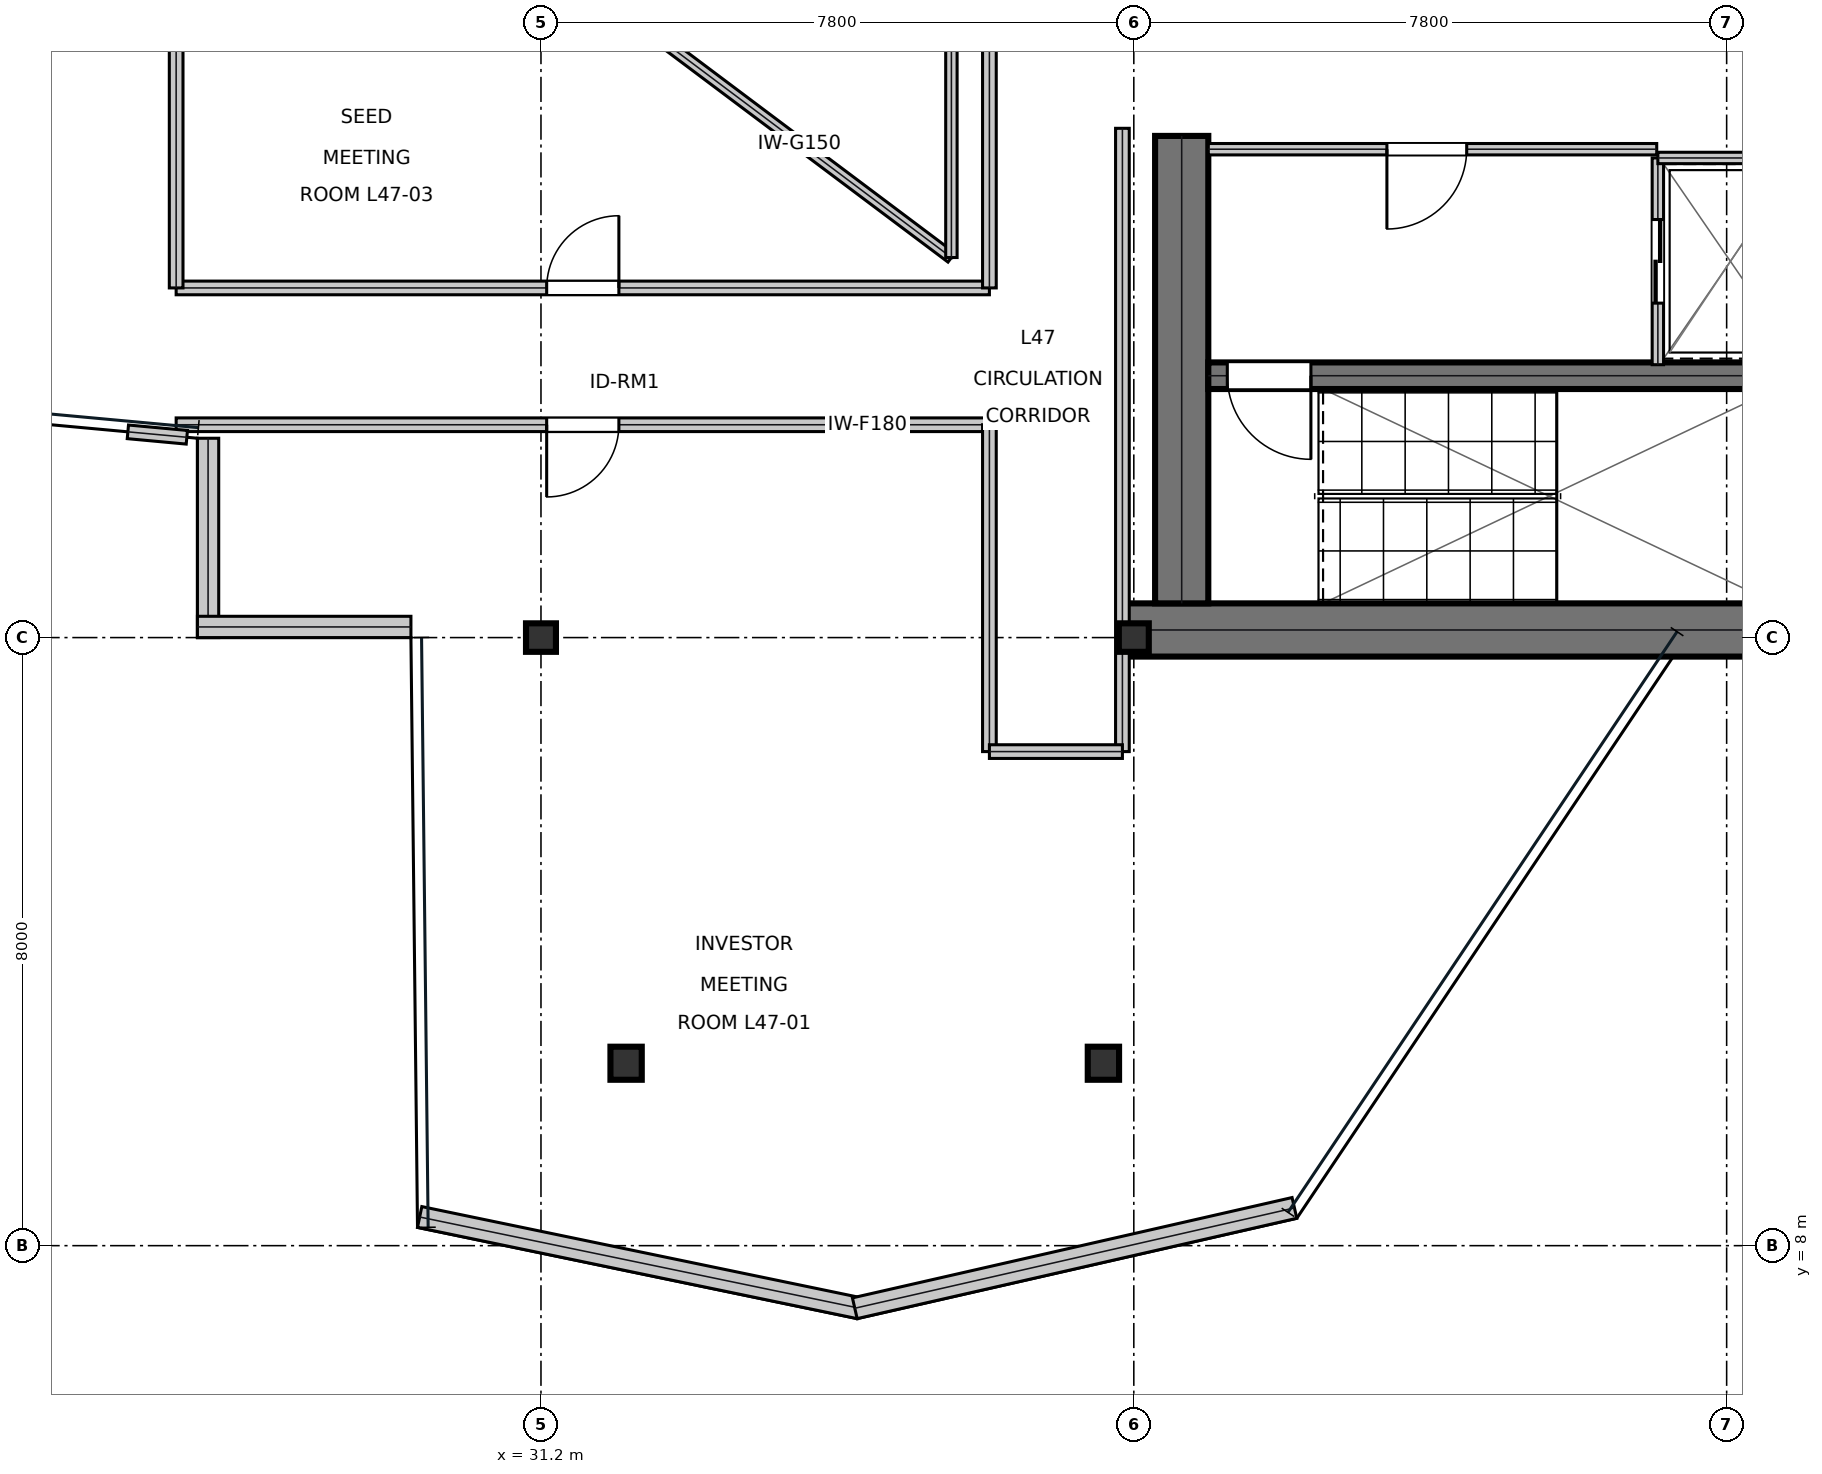
"""IFC4 building model, lengths in metres.
Left out: names, types, materials, properties, quantities, classifications, styles, units other than length and angle.
Written with IfcOpenShell. Run it as: python <this file> out.ifc"""

import sys

from ifc_helpers import new_model, si_unit, direction, frame, frame_2d, origin, origin_2d, place, context, subcontext, project, spatial, rectangle, i_section, extrude, element, fill, save


model = new_model("IFC4")
c1 = context("Model", 3, precision=1e-05, world=origin(), true_north=direction((0.0, 1.0)))
c2 = subcontext(c1, "Body", "Model", "MODEL_VIEW")
j1 = project(units=[si_unit("LENGTHUNIT", "METRE"), si_unit("PLANEANGLEUNIT", "RADIAN")], contexts=[c1])
p1 = place(None, origin())
s1 = spatial("IfcSite", under=j1, at=p1, CompositionType="ELEMENT")
p2 = place(p1, origin())
s2 = spatial("IfcBuilding", under=s1, at=p2, CompositionType="ELEMENT")
p3 = place(p2, frame((0.0, 0.0, 204.0)))
s3 = spatial("IfcBuildingStorey", under=s2, at=p3, CompositionType="ELEMENT", Elevation=204.0)
p4 = place(p3, frame((38.8, 16.1, 0.0), z_axis=(0.0, 0.0, 1.0), x_axis=(1.0, 0.0, 0.0)))
e1 = element("IfcWall", 1, at=p4, inside=s3, PredefinedType="SHEAR", context=c2, shape_type="SweptSolid", body=[
    extrude(rectangle(XDim=16.0, YDim=0.7, at=frame_2d((8.0, 0.0))), origin(), (0.0, 0.0, 1.0), 3.79),
])
p5 = place(p3, frame((39.63, 16.45, 0.0), z_axis=(0.0, 0.0, 1.0), x_axis=(0.0, 1.0, 0.0)))
e2 = element("IfcWall", 2, at=p5, inside=s3, PredefinedType="SHEAR", context=c2, shape_type="SweptSolid", body=[
    extrude(rectangle(XDim=6.15, YDim=0.7, at=frame_2d((3.075, 0.0))), origin(), (0.0, 0.0, 1.0), 3.79),
])
p6 = place(p3, frame((39.98, 19.445, 0.0), z_axis=(0.0, 0.0, 1.0), x_axis=(1.0, 0.0, 0.0)))
e3 = element("IfcWall", 3, at=p6, inside=s3, PredefinedType="SHEAR", context=c2, shape_type="SweptSolid", body=[
    extrude(rectangle(XDim=7.71, YDim=0.35, at=frame_2d((3.855, 0.0))), origin(), (0.0, 0.0, 1.0), 3.79),
])
p7 = place(p6, frame((0.25, 0.0, 0.0)))
e4 = element("IfcOpeningElement", 4, at=p7, cuts=e3, PredefinedType="OPENING", context=c2, shape_type="SweptSolid", body=[
    extrude(rectangle(XDim=1.1, YDim=2.15, at=frame_2d((0.55, 1.075))), frame((0.0, 0.185, 0.0), z_axis=(0.0, -1.0, 0.0), x_axis=(1.0, 0.0, 0.0)), (0.0, 0.0, 1.0), 0.37),
])
for number, where, z_axis, x_axis in (
    (5, (31.2, 16.0, 0.0), (0.0, 0.0, 1.0), (1.0, 0.0, 0.0)),
    (6, (39.0, 16.0, 0.0), (0.0, 0.0, 1.0), (1.0, 0.0, 0.0)),
):
    element("IfcColumn", number, at=place(p3, frame(where, z_axis=z_axis, x_axis=x_axis)), inside=s3, PredefinedType="COLUMN", context=c2, shape_type="SweptSolid", body=[
        extrude(i_section(OverallWidth=0.394, OverallDepth=0.375, WebThickness=0.017, FlangeThickness=0.028, at=origin_2d()), origin(), (0.0, 0.0, 1.0), 4.044),
    ])
for number, where, z_axis, x_axis in (
    (7, (32.32, 10.4, 0.016), (0.0, 0.0, 1.0), (1.0, 0.0, 0.0)),
    (8, (38.6, 10.4, 0.016), (0.0, 0.0, 1.0), (1.0, 0.0, 0.0)),
):
    element("IfcColumn", number, at=place(p3, frame(where, z_axis=z_axis, x_axis=x_axis)), inside=s3, PredefinedType="COLUMN", context=c2, shape_type="SweptSolid", body=[
        extrude(i_section(OverallWidth=0.412, OverallDepth=0.435, WebThickness=0.036, FlangeThickness=0.058, at=origin_2d()), origin(), (0.0, 0.0, 1.0), 4.018),
    ])
p8 = place(p3, frame((26.82, 18.622, 0.0), z_axis=(0.0, 0.0, 1.0), x_axis=(0.0, -1.0, 0.0)))
e9 = element("IfcWall", 9, at=p8, inside=s3, PredefinedType="STANDARD", context=c2, shape_type="SweptSolid", body=[
    extrude(rectangle(XDim=2.622, YDim=0.28, at=frame_2d((1.311, 0.0))), origin(), (0.0, 0.0, 1.0), 3.319),
])
p9 = place(p3, frame((26.68, 16.14, 0.0), z_axis=(0.0, 0.0, 1.0), x_axis=(1.0, 0.0, 0.0)))
e10 = element("IfcWall", 10, at=p9, inside=s3, PredefinedType="STANDARD", context=c2, shape_type="SweptSolid", body=[
    extrude(rectangle(XDim=2.809, YDim=0.28, at=frame_2d((1.405, 0.0))), origin(), (0.0, 0.0, 1.0), 3.79),
])
p10 = place(p3, frame((29.604, 8.377, 0.0), z_axis=(0.0, 0.0, 1.0), x_axis=(0.979145472124, -0.203160390873, 0.0)))
e11 = element("IfcWall", 11, at=p10, inside=s3, PredefinedType="STANDARD", context=c2, shape_type="SweptSolid", body=[
    extrude(rectangle(XDim=5.908, YDim=0.28, at=frame_2d((2.954, 0.0))), origin(), (0.0, 0.0, 1.0), 3.79),
])
p11 = place(p3, frame((35.329, 7.177, 0.0), z_axis=(0.0, 0.0, 1.0), x_axis=(0.974934808954, 0.222490715064, 0.0)))
e12 = element("IfcWall", 12, at=p11, inside=s3, PredefinedType="STANDARD", context=c2, shape_type="SweptSolid", body=[
    extrude(rectangle(XDim=5.933, YDim=0.28, at=frame_2d((2.967, 0.0))), origin(), (0.0, 0.0, 1.0), 3.79),
])
p12 = place(p3, frame((39.98, 22.425, 0.0), z_axis=(0.0, 0.0, 1.0), x_axis=(1.0, 0.0, 0.0)))
e13 = element("IfcWall", 13, at=p12, inside=s3, PredefinedType="PARTITIONING", context=c2, shape_type="SweptSolid", body=[
    extrude(rectangle(XDim=5.9, YDim=0.15, at=frame_2d((2.95, 0.0))), origin(), (0.0, 0.0, 1.0), 3.79),
])
p13 = place(p12, frame((2.35, 0.0, 0.0)))
e14 = element("IfcOpeningElement", 14, at=p13, cuts=e13, PredefinedType="OPENING", context=c2, shape_type="SweptSolid", body=[
    extrude(rectangle(XDim=1.05, YDim=2.15, at=frame_2d((0.525, 1.075))), frame((0.0, 0.085, 0.0), z_axis=(0.0, -1.0, 0.0), x_axis=(1.0, 0.0, 0.0)), (0.0, 0.0, 1.0), 0.17),
])
p14 = place(p3, frame((45.895, 19.59, 0.0), z_axis=(0.0, 0.0, 1.0), x_axis=(0.0, 1.0, 0.0)))
e15 = element("IfcWall", 15, at=p14, inside=s3, PredefinedType="PARTITIONING", context=c2, shape_type="SweptSolid", body=[
    extrude(rectangle(XDim=2.72, YDim=0.15, at=frame_2d((1.36, 0.0))), origin(), (0.0, 0.0, 1.0), 3.79),
])
p15 = place(p14, frame((0.81, 0.0, 0.0)))
e16 = element("IfcOpeningElement", 16, at=p15, cuts=e15, PredefinedType="OPENING", context=c2, shape_type="SweptSolid", body=[
    extrude(rectangle(XDim=1.1, YDim=2.15, at=frame_2d((0.55, 1.075))), frame((0.0, 0.085, 0.0), z_axis=(0.0, -1.0, 0.0), x_axis=(1.0, 0.0, 0.0)), (0.0, 0.0, 1.0), 0.17),
])
p16 = place(p3, frame((45.895, 22.31, 0.0), z_axis=(0.0, 0.0, 1.0), x_axis=(1.0, 0.0, 0.0)))
e17 = element("IfcWall", 17, at=p16, inside=s3, PredefinedType="PARTITIONING", context=c2, shape_type="SweptSolid", body=[
    extrude(rectangle(XDim=1.915, YDim=0.15, at=frame_2d((0.958, 0.0))), origin(), (0.0, 0.0, 1.0), 3.79),
])
p17 = place(p3, frame((26.4, 18.8, 0.0), z_axis=(0.0, 0.0, 1.0), x_axis=(1.0, 0.0, 0.0)))
e18 = element("IfcWall", 18, at=p17, inside=s3, PredefinedType="SOLIDWALL", context=c2, shape_type="SweptSolid", body=[
    extrude(rectangle(XDim=10.7, YDim=0.18, at=frame_2d((5.35, 0.0))), origin(), (0.0, 0.0, 1.0), 3.241),
])
p18 = place(p17, frame((4.875, 0.0, 0.0)))
e19 = element("IfcOpeningElement", 19, at=p18, cuts=e18, PredefinedType="OPENING", context=c2, shape_type="SweptSolid", body=[
    extrude(rectangle(XDim=0.95, YDim=2.15, at=frame_2d((0.475, 1.075))), frame((0.0, 0.1, 0.0), z_axis=(0.0, -1.0, 0.0), x_axis=(1.0, 0.0, 0.0)), (0.0, 0.0, 1.0), 0.2),
])
p19 = place(p3, frame((26.4, 20.6, 0.0), z_axis=(0.0, 0.0, 1.0), x_axis=(1.0, 0.0, 0.0)))
e20 = element("IfcWall", 20, at=p19, inside=s3, PredefinedType="SOLIDWALL", context=c2, shape_type="SweptSolid", body=[
    extrude(rectangle(XDim=10.7, YDim=0.18, at=frame_2d((5.35, 0.0))), origin(), (0.0, 0.0, 1.0), 3.241),
])
p20 = place(p19, frame((4.875, 0.0, 0.0)))
e21 = element("IfcOpeningElement", 21, at=p20, cuts=e20, PredefinedType="OPENING", context=c2, shape_type="SweptSolid", body=[
    extrude(rectangle(XDim=0.95, YDim=2.15, at=frame_2d((0.475, 1.075))), frame((0.0, 0.1, 0.0), z_axis=(0.0, -1.0, 0.0), x_axis=(1.0, 0.0, 0.0)), (0.0, 0.0, 1.0), 0.2),
])
p21 = place(p3, frame((38.85, 14.5, 0.0), z_axis=(0.0, 0.0, 1.0), x_axis=(0.0, 1.0, 0.0)))
e22 = element("IfcWall", 22, at=p21, inside=s3, PredefinedType="SOLIDWALL", context=c2, shape_type="SweptSolid", body=[
    extrude(rectangle(XDim=8.2, YDim=0.18, at=frame_2d((4.1, 0.0))), origin(), (0.0, 0.0, 1.0), 3.241),
])
p22 = place(p3, frame((37.1, 14.5, 0.0), z_axis=(0.0, 0.0, 1.0), x_axis=(0.0, 1.0, 0.0)))
e23 = element("IfcWall", 23, at=p22, inside=s3, PredefinedType="SOLIDWALL", context=c2, shape_type="SweptSolid", body=[
    extrude(rectangle(XDim=4.3, YDim=0.18, at=frame_2d((2.15, 0.0))), origin(), (0.0, 0.0, 1.0), 3.241),
])
p23 = place(p3, frame((37.1, 14.5, 0.0), z_axis=(0.0, 0.0, 1.0), x_axis=(1.0, 0.0, 0.0)))
e24 = element("IfcWall", 24, at=p23, inside=s3, PredefinedType="SOLIDWALL", context=c2, shape_type="SweptSolid", body=[
    extrude(rectangle(XDim=1.75, YDim=0.18, at=frame_2d((0.875, 0.0))), origin(), (0.0, 0.0, 1.0), 3.241),
])
p24 = place(p3, frame((25.765, 18.707, 0.0), z_axis=(0.0, 0.0, 1.0), x_axis=(0.995774178655, -0.091835641909, 0.0)))
e25 = element("IfcWall", 25, at=p24, inside=s3, PredefinedType="SOLIDWALL", context=c2, shape_type="SweptSolid", body=[
    extrude(rectangle(XDim=0.779, YDim=0.18, at=frame_2d((0.389, 0.0))), origin(), (0.0, 0.0, 1.0), 3.79),
])
p25 = place(p3, frame((26.4, 20.6, 0.0), z_axis=(0.0, 0.0, 1.0), x_axis=(0.0, 1.0, 0.0)))
e26 = element("IfcWall", 26, at=p25, inside=s3, PredefinedType="SOLIDWALL", context=c2, shape_type="SweptSolid", body=[
    extrude(rectangle(XDim=4.078, YDim=0.18, at=frame_2d((2.039, 0.0))), origin(), (0.0, 0.0, 1.0), 3.241),
])
p26 = place(p3, frame((37.1, 20.6, 0.0), z_axis=(0.0, 0.0, 1.0), x_axis=(0.0, 1.0, 0.0)))
e27 = element("IfcWall", 27, at=p26, inside=s3, PredefinedType="SOLIDWALL", context=c2, shape_type="SweptSolid", body=[
    extrude(rectangle(XDim=4.078, YDim=0.18, at=frame_2d((2.039, 0.0))), origin(), (0.0, 0.0, 1.0), 3.79),
])
p27 = place(p3, frame((32.6, 24.0, 0.0), z_axis=(0.0, 0.0, 1.0), x_axis=(0.8, -0.6, 0.0)))
e28 = element("IfcWall", 28, at=p27, inside=s3, PredefinedType="MOVABLE", context=c2, shape_type="SweptSolid", body=[
    extrude(rectangle(XDim=5.0, YDim=0.15, at=frame_2d((2.5, 0.0))), origin(), (0.0, 0.0, 1.0), 3.79),
])
p28 = place(p3, frame((36.6, 21.0, 0.0), z_axis=(0.0, 0.0, 1.0), x_axis=(0.0, 1.0, 0.0)))
e29 = element("IfcWall", 29, at=p28, inside=s3, PredefinedType="MOVABLE", context=c2, shape_type="SweptSolid", body=[
    extrude(rectangle(XDim=6.0, YDim=0.15, at=frame_2d((3.0, 0.0))), origin(), (0.0, 0.0, 1.0), 3.79),
])
p29 = place(p13, frame((1.05, 0.0, 0.0), z_axis=(0.0, 0.0, 1.0), x_axis=(-1.0, 0.0, 0.0)))
e30 = element("IfcDoor", 30, at=p29, inside=s3, OperationType="SINGLE_SWING_RIGHT", PredefinedType="DOOR", context=c2, shape_type="SweptSolid", body=[
    extrude(rectangle(XDim=1.05, YDim=2.15, at=frame_2d((0.525, 1.075))), frame((0.0, 0.025, 0.0), z_axis=(0.0, -1.0, 0.0), x_axis=(1.0, 0.0, 0.0)), (0.0, 0.0, 1.0), 0.05),
])
fill(e14, e30)
p30 = place(p15, frame((1.1, 0.0, 0.0), z_axis=(0.0, 0.0, 1.0), x_axis=(-1.0, 0.0, 0.0)))
e31 = element("IfcDoor", 31, at=p30, inside=s3, OperationType="DOUBLE_DOOR_SLIDING", PredefinedType="DOOR", context=c2, shape_type="SweptSolid", body=[
    extrude(rectangle(XDim=1.1, YDim=2.15, at=frame_2d((0.55, 1.075))), frame((0.0, 0.025, 0.0), z_axis=(0.0, -1.0, 0.0), x_axis=(1.0, 0.0, 0.0)), (0.0, 0.0, 1.0), 0.05),
])
fill(e16, e31)
p31 = place(p18, frame((0.95, 0.0, 0.0), z_axis=(0.0, 0.0, 1.0), x_axis=(-1.0, 0.0, 0.0)))
e32 = element("IfcDoor", 32, at=p31, inside=s3, OperationType="SINGLE_SWING_RIGHT", PredefinedType="DOOR", context=c2, shape_type="SweptSolid", body=[
    extrude(rectangle(XDim=0.95, YDim=2.15, at=frame_2d((0.475, 1.075))), frame((0.0, 0.025, 0.0), z_axis=(0.0, -1.0, 0.0), x_axis=(1.0, 0.0, 0.0)), (0.0, 0.0, 1.0), 0.05),
])
fill(e19, e32)
p32 = place(p20, origin())
e33 = element("IfcDoor", 33, at=p32, inside=s3, OperationType="SINGLE_SWING_RIGHT", PredefinedType="DOOR", context=c2, shape_type="SweptSolid", body=[
    extrude(rectangle(XDim=0.95, YDim=2.15, at=frame_2d((0.475, 1.075))), frame((0.0, 0.025, 0.0), z_axis=(0.0, -1.0, 0.0), x_axis=(1.0, 0.0, 0.0)), (0.0, 0.0, 1.0), 0.05),
])
fill(e21, e33)
p33 = place(p7, frame((1.1, 0.0, 0.0), z_axis=(0.0, 0.0, 1.0), x_axis=(-1.0, 0.0, 0.0)))
e34 = element("IfcDoor", 34, at=p33, inside=s3, OperationType="SINGLE_SWING_LEFT", PredefinedType="DOOR", context=c2, shape_type="SweptSolid", body=[
    extrude(rectangle(XDim=1.1, YDim=2.15, at=frame_2d((0.55, 1.075))), frame((0.0, 0.025, 0.0), z_axis=(0.0, -1.0, 0.0), x_axis=(1.0, 0.0, 0.0)), (0.0, 0.0, 1.0), 0.05),
])
fill(e4, e34)
save(model, sys.argv[1])
